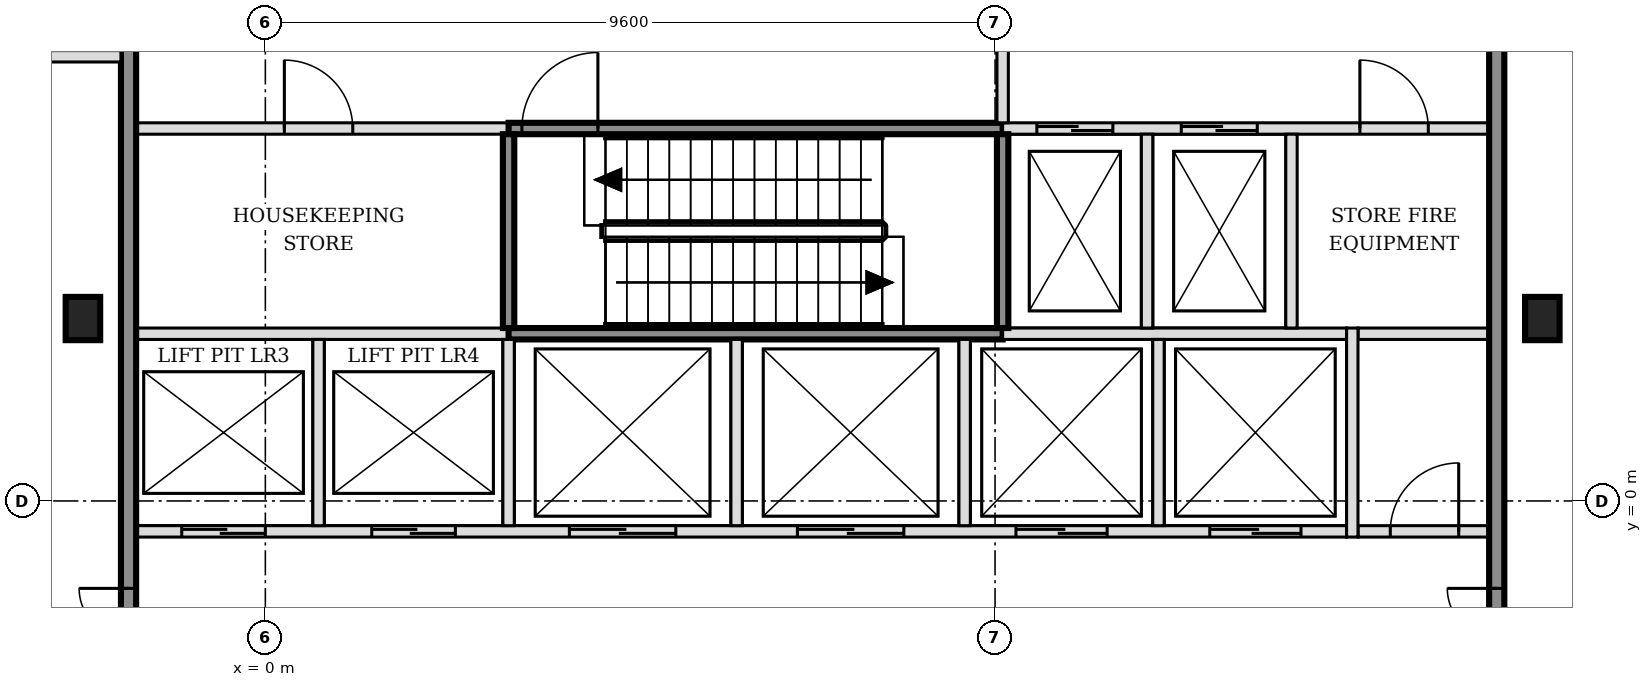
"""IFC4 building model, lengths in metres.
Left out: names, types, materials, properties, quantities, classifications, styles, units other than length and angle.
Written with IfcOpenShell. Run it as: python <this file> out.ifc"""

import sys

from ifc_helpers import new_model, si_unit, direction, frame, frame_2d, origin, origin_2d, place, context, subcontext, project, spatial, rectangle, i_section, extrude, element, fill, save


model = new_model("IFC4")
c1 = context("Model", 3, precision=1e-05, world=origin(), true_north=direction((0.0, 1.0)))
c2 = subcontext(c1, "Body", "Model", "MODEL_VIEW")
j1 = project(units=[si_unit("LENGTHUNIT", "METRE"), si_unit("PLANEANGLEUNIT", "RADIAN")], contexts=[c1])
p1 = place(None, origin())
s1 = spatial("IfcSite", under=j1, at=p1, CompositionType="ELEMENT")
p2 = place(p1, origin())
s2 = spatial("IfcBuilding", under=s1, at=p2, CompositionType="ELEMENT")
p3 = place(p2, origin())
s3 = spatial("IfcBuildingStorey", under=s2, at=p3, CompositionType="ELEMENT", Elevation=0.0)
for number, where, z_axis, x_axis in (
    (1, (-2.4, 2.4, -0.25), (0.0, 0.0, 1.0), (1.0, 0.0, 0.0)),
    (2, (16.8, 2.4, -0.25), (0.0, 0.0, 1.0), (1.0, 0.0, 0.0)),
):
    element("IfcColumn", number, at=place(p3, frame(where, z_axis=z_axis, x_axis=x_axis)), inside=s3, PredefinedType="COLUMN", context=c2, shape_type="SweptSolid", body=[
        extrude(i_section(OverallWidth=0.454, OverallDepth=0.569, WebThickness=0.078, FlangeThickness=0.125, FilletRadius=0.015, at=origin_2d()), origin(), (0.0, 0.0, 1.0), 9.05),
    ])
p4 = place(p3, frame((-1.7, -0.4, 0.0), z_axis=(0.0, 0.0, 1.0), x_axis=(1.0, 0.0, 0.0)))
e3 = element("IfcWall", 3, at=p4, inside=s3, PredefinedType="SOLIDWALL", context=c2, shape_type="SweptSolid", body=[
    extrude(rectangle(XDim=15.925, YDim=0.15, at=frame_2d((7.962, 0.0))), origin(), (0.0, 0.0, 1.0), 8.8),
])
p5 = place(p4, frame((0.6, 0.0, 0.0)))
e4 = element("IfcOpeningElement", 4, at=p5, cuts=e3, PredefinedType="OPENING", context=c2, shape_type="SweptSolid", body=[
    extrude(rectangle(XDim=1.1, YDim=2.1, at=frame_2d((0.55, 1.05))), frame((0.0, 0.085, 0.0), z_axis=(0.0, -1.0, 0.0), x_axis=(1.0, 0.0, 0.0)), (0.0, 0.0, 1.0), 0.17),
])
p6 = place(p4, frame((3.1, 0.0, 0.0)))
e5 = element("IfcOpeningElement", 5, at=p6, cuts=e3, PredefinedType="OPENING", context=c2, shape_type="SweptSolid", body=[
    extrude(rectangle(XDim=1.1, YDim=2.1, at=frame_2d((0.55, 1.05))), frame((0.0, 0.085, 0.0), z_axis=(0.0, -1.0, 0.0), x_axis=(1.0, 0.0, 0.0)), (0.0, 0.0, 1.0), 0.17),
])
p7 = place(p4, frame((5.7, 0.0, 0.0)))
e6 = element("IfcOpeningElement", 6, at=p7, cuts=e3, PredefinedType="OPENING", context=c2, shape_type="SweptSolid", body=[
    extrude(rectangle(XDim=1.4, YDim=2.1, at=frame_2d((0.7, 1.05))), frame((0.0, 0.085, 0.0), z_axis=(0.0, -1.0, 0.0), x_axis=(1.0, 0.0, 0.0)), (0.0, 0.0, 1.0), 0.17),
])
p8 = place(p4, frame((8.7, 0.0, 0.0)))
e7 = element("IfcOpeningElement", 7, at=p8, cuts=e3, PredefinedType="OPENING", context=c2, shape_type="SweptSolid", body=[
    extrude(rectangle(XDim=1.4, YDim=2.1, at=frame_2d((0.7, 1.05))), frame((0.0, 0.085, 0.0), z_axis=(0.0, -1.0, 0.0), x_axis=(1.0, 0.0, 0.0)), (0.0, 0.0, 1.0), 0.17),
])
p9 = place(p4, frame((11.575, 0.0, 0.0)))
e8 = element("IfcOpeningElement", 8, at=p9, cuts=e3, PredefinedType="OPENING", context=c2, shape_type="SweptSolid", body=[
    extrude(rectangle(XDim=1.2, YDim=2.1, at=frame_2d((0.6, 1.05))), frame((0.0, 0.085, 0.0), z_axis=(0.0, -1.0, 0.0), x_axis=(1.0, 0.0, 0.0)), (0.0, 0.0, 1.0), 0.17),
])
p10 = place(p4, frame((14.125, 0.0, 0.0)))
e9 = element("IfcOpeningElement", 9, at=p10, cuts=e3, PredefinedType="OPENING", context=c2, shape_type="SweptSolid", body=[
    extrude(rectangle(XDim=1.2, YDim=2.1, at=frame_2d((0.6, 1.05))), frame((0.0, 0.085, 0.0), z_axis=(0.0, -1.0, 0.0), x_axis=(1.0, 0.0, 0.0)), (0.0, 0.0, 1.0), 0.17),
])
p11 = place(p3, frame((14.375, -0.4, 0.0), z_axis=(0.0, 0.0, 1.0), x_axis=(1.0, 0.0, 0.0)))
e10 = element("IfcWall", 10, at=p11, inside=s3, PredefinedType="PARTITIONING", context=c2, shape_type="SweptSolid", body=[
    extrude(rectangle(XDim=1.725, YDim=0.15, at=frame_2d((0.863, 0.0))), origin(), (0.0, 0.0, 1.0), 8.8),
])
p12 = place(p11, frame((0.425, 0.0, 0.0)))
e11 = element("IfcOpeningElement", 11, at=p12, cuts=e10, PredefinedType="OPENING", context=c2, shape_type="SweptSolid", body=[
    extrude(rectangle(XDim=0.9, YDim=2.1, at=frame_2d((0.45, 1.05))), frame((0.0, 0.085, 0.0), z_axis=(0.0, -1.0, 0.0), x_axis=(1.0, 0.0, 0.0)), (0.0, 0.0, 1.0), 0.17),
])
p13 = place(p3, frame((-1.7, 2.2, 0.0), z_axis=(0.0, 0.0, 1.0), x_axis=(1.0, 0.0, 0.0)))
e12 = element("IfcWall", 12, at=p13, inside=s3, PredefinedType="SOLIDWALL", context=c2, shape_type="SweptSolid", body=[
    extrude(rectangle(XDim=4.9, YDim=0.15, at=frame_2d((2.45, 0.0))), origin(), (0.0, 0.0, 1.0), 8.8),
])
p14 = place(p3, frame((3.2, 2.2, 0.0), z_axis=(0.0, 0.0, 1.0), x_axis=(1.0, 0.0, 0.0)))
e13 = element("IfcWall", 13, at=p14, inside=s3, PredefinedType="SOLIDWALL", context=c2, shape_type="SweptSolid", body=[
    extrude(rectangle(XDim=6.5, YDim=0.15, at=frame_2d((3.25, 0.0))), origin(), (0.0, 0.0, 1.0), 8.8),
])
p15 = place(p3, frame((9.7, 2.2, 0.0), z_axis=(0.0, 0.0, 1.0), x_axis=(1.0, 0.0, 0.0)))
e14 = element("IfcWall", 14, at=p15, inside=s3, PredefinedType="SOLIDWALL", context=c2, shape_type="SweptSolid", body=[
    extrude(rectangle(XDim=4.525, YDim=0.15, at=frame_2d((2.263, 0.0))), origin(), (0.0, 0.0, 1.0), 8.8),
])
p16 = place(p3, frame((14.375, 2.2, 0.0), z_axis=(0.0, 0.0, 1.0), x_axis=(1.0, 0.0, 0.0)))
e15 = element("IfcWall", 15, at=p16, inside=s3, PredefinedType="PARTITIONING", context=c2, shape_type="SweptSolid", body=[
    extrude(rectangle(XDim=1.725, YDim=0.15, at=frame_2d((0.863, 0.0))), origin(), (0.0, 0.0, 1.0), 8.8),
])
p17 = place(p3, frame((-1.7, 4.9, 0.0), z_axis=(0.0, 0.0, 1.0), x_axis=(1.0, 0.0, 0.0)))
e16 = element("IfcWall", 16, at=p17, inside=s3, PredefinedType="SOLIDWALL", context=c2, shape_type="SweptSolid", body=[
    extrude(rectangle(XDim=4.9, YDim=0.15, at=frame_2d((2.45, 0.0))), origin(), (0.0, 0.0, 1.0), 8.8),
])
p18 = place(p17, frame((1.95, 0.0, 0.0)))
e17 = element("IfcOpeningElement", 17, at=p18, cuts=e16, PredefinedType="OPENING", context=c2, shape_type="SweptSolid", body=[
    extrude(rectangle(XDim=0.9, YDim=2.1, at=frame_2d((0.45, 1.05))), frame((0.0, 0.085, 0.0), z_axis=(0.0, -1.0, 0.0), x_axis=(1.0, 0.0, 0.0)), (0.0, 0.0, 1.0), 0.17),
])
p19 = place(p3, frame((3.2, 4.9, 0.0), z_axis=(0.0, 0.0, 1.0), x_axis=(1.0, 0.0, 0.0)))
e18 = element("IfcWall", 18, at=p19, inside=s3, PredefinedType="SOLIDWALL", context=c2, shape_type="SweptSolid", body=[
    extrude(rectangle(XDim=6.5, YDim=0.15, at=frame_2d((3.25, 0.0))), origin(), (0.0, 0.0, 1.0), 8.8),
])
p20 = place(p19, frame((0.175, 0.0, 0.0)))
e19 = element("IfcOpeningElement", 19, at=p20, cuts=e18, PredefinedType="OPENING", context=c2, shape_type="SweptSolid", body=[
    extrude(rectangle(XDim=1.0, YDim=2.1, at=frame_2d((0.5, 1.05))), frame((0.0, 0.085, 0.0), z_axis=(0.0, -1.0, 0.0), x_axis=(1.0, 0.0, 0.0)), (0.0, 0.0, 1.0), 0.17),
])
p21 = place(p3, frame((9.7, 4.9, 0.0), z_axis=(0.0, 0.0, 1.0), x_axis=(1.0, 0.0, 0.0)))
e20 = element("IfcWall", 20, at=p21, inside=s3, PredefinedType="SOLIDWALL", context=c2, shape_type="SweptSolid", body=[
    extrude(rectangle(XDim=6.4, YDim=0.15, at=frame_2d((3.2, 0.0))), origin(), (0.0, 0.0, 1.0), 8.8),
])
p22 = place(p21, frame((0.45, 0.0, 0.0)))
e21 = element("IfcOpeningElement", 21, at=p22, cuts=e20, PredefinedType="OPENING", context=c2, shape_type="SweptSolid", body=[
    extrude(rectangle(XDim=1.0, YDim=2.1, at=frame_2d((0.5, 1.05))), frame((0.0, 0.085, 0.0), z_axis=(0.0, -1.0, 0.0), x_axis=(1.0, 0.0, 0.0)), (0.0, 0.0, 1.0), 0.17),
])
p23 = place(p21, frame((2.35, 0.0, 0.0)))
e22 = element("IfcOpeningElement", 22, at=p23, cuts=e20, PredefinedType="OPENING", context=c2, shape_type="SweptSolid", body=[
    extrude(rectangle(XDim=1.0, YDim=2.1, at=frame_2d((0.5, 1.05))), frame((0.0, 0.085, 0.0), z_axis=(0.0, -1.0, 0.0), x_axis=(1.0, 0.0, 0.0)), (0.0, 0.0, 1.0), 0.17),
])
p24 = place(p21, frame((4.7, 0.0, 0.0)))
e23 = element("IfcOpeningElement", 23, at=p24, cuts=e20, PredefinedType="OPENING", context=c2, shape_type="SweptSolid", body=[
    extrude(rectangle(XDim=0.9, YDim=2.1, at=frame_2d((0.45, 1.05))), frame((0.0, 0.085, 0.0), z_axis=(0.0, -1.0, 0.0), x_axis=(1.0, 0.0, 0.0)), (0.0, 0.0, 1.0), 0.17),
])
p25 = place(p3, frame((-1.8, -5.5, 0.0), z_axis=(0.0, 0.0, 1.0), x_axis=(0.0, 1.0, 0.0)))
e24 = element("IfcWall", 24, at=p25, inside=s3, PredefinedType="SOLIDWALL", context=c2, shape_type="SweptSolid", body=[
    extrude(rectangle(XDim=15.8, YDim=0.2, at=frame_2d((7.9, 0.0))), origin(), (0.0, 0.0, 1.0), 8.8),
])
p26 = place(p25, frame((3.05, 0.0, 0.0)))
e25 = element("IfcOpeningElement", 25, at=p26, cuts=e24, PredefinedType="OPENING", context=c2, shape_type="SweptSolid", body=[
    extrude(rectangle(XDim=1.3, YDim=2.1, at=frame_2d((0.65, 1.05))), frame((0.0, 0.11, 0.0), z_axis=(0.0, -1.0, 0.0), x_axis=(1.0, 0.0, 0.0)), (0.0, 0.0, 1.0), 0.22),
])
p27 = place(p25, frame((11.45, 0.0, 0.0)))
e26 = element("IfcOpeningElement", 26, at=p27, cuts=e24, PredefinedType="OPENING", context=c2, shape_type="SweptSolid", body=[
    extrude(rectangle(XDim=1.3, YDim=2.1, at=frame_2d((0.65, 1.05))), frame((0.0, 0.11, 0.0), z_axis=(0.0, -1.0, 0.0), x_axis=(1.0, 0.0, 0.0)), (0.0, 0.0, 1.0), 0.22),
])
for number, where, z_axis, x_axis in (
    (27, (0.7, -0.325, 0.0), (0.0, 0.0, 1.0), (0.0, 1.0, 0.0)),
    (28, (3.2, -0.325, 0.0), (0.0, 0.0, 1.0), (0.0, 1.0, 0.0)),
):
    element("IfcWall", number, at=place(p3, frame(where, z_axis=z_axis, x_axis=x_axis)), inside=s3, PredefinedType="SOLIDWALL", context=c2, shape_type="SweptSolid", body=[
        extrude(rectangle(XDim=2.45, YDim=0.15, at=frame_2d((1.225, 0.0))), origin(), (0.0, 0.0, 1.0), 8.8),
    ])
p28 = place(p3, frame((3.2, 2.275, 0.0), z_axis=(0.0, 0.0, 1.0), x_axis=(0.0, 1.0, 0.0)))
e29 = element("IfcWall", 29, at=p28, inside=s3, PredefinedType="SOLIDWALL", context=c2, shape_type="SweptSolid", body=[
    extrude(rectangle(XDim=2.55, YDim=0.15, at=frame_2d((1.275, 0.0))), origin(), (0.0, 0.0, 1.0), 8.8),
])
for number, where, z_axis, x_axis in (
    (30, (6.2, -0.325, 0.0), (0.0, 0.0, 1.0), (0.0, 1.0, 0.0)),
    (31, (9.2, -0.325, 0.0), (0.0, 0.0, 1.0), (0.0, 1.0, 0.0)),
):
    element("IfcWall", number, at=place(p3, frame(where, z_axis=z_axis, x_axis=x_axis)), inside=s3, PredefinedType="SOLIDWALL", context=c2, shape_type="SweptSolid", body=[
        extrude(rectangle(XDim=2.45, YDim=0.15, at=frame_2d((1.225, 0.0))), origin(), (0.0, 0.0, 1.0), 8.8),
    ])
p29 = place(p3, frame((9.7, 2.275, 0.0), z_axis=(0.0, 0.0, 1.0), x_axis=(0.0, 1.0, 0.0)))
e32 = element("IfcWall", 32, at=p29, inside=s3, PredefinedType="SOLIDWALL", context=c2, shape_type="SweptSolid", body=[
    extrude(rectangle(XDim=2.55, YDim=0.15, at=frame_2d((1.275, 0.0))), origin(), (0.0, 0.0, 1.0), 8.8),
])
p30 = place(p3, frame((9.7, 4.975, 0.0), z_axis=(0.0, 0.0, 1.0), x_axis=(0.0, 1.0, 0.0)))
e33 = element("IfcWall", 33, at=p30, inside=s3, PredefinedType="SOLIDWALL", context=c2, shape_type="SweptSolid", body=[
    extrude(rectangle(XDim=2.45, YDim=0.15, at=frame_2d((1.225, 0.0))), origin(), (0.0, 0.0, 1.0), 8.8),
])
p31 = place(p3, frame((11.6, 2.275, 0.0), z_axis=(0.0, 0.0, 1.0), x_axis=(0.0, 1.0, 0.0)))
e34 = element("IfcWall", 34, at=p31, inside=s3, PredefinedType="SOLIDWALL", context=c2, shape_type="SweptSolid", body=[
    extrude(rectangle(XDim=2.55, YDim=0.15, at=frame_2d((1.275, 0.0))), origin(), (0.0, 0.0, 1.0), 8.8),
])
p32 = place(p3, frame((11.75, -0.325, 0.0), z_axis=(0.0, 0.0, 1.0), x_axis=(0.0, 1.0, 0.0)))
e35 = element("IfcWall", 35, at=p32, inside=s3, PredefinedType="SOLIDWALL", context=c2, shape_type="SweptSolid", body=[
    extrude(rectangle(XDim=2.45, YDim=0.15, at=frame_2d((1.225, 0.0))), origin(), (0.0, 0.0, 1.0), 8.8),
])
p33 = place(p3, frame((13.5, 2.275, 0.0), z_axis=(0.0, 0.0, 1.0), x_axis=(0.0, 1.0, 0.0)))
e36 = element("IfcWall", 36, at=p33, inside=s3, PredefinedType="SOLIDWALL", context=c2, shape_type="SweptSolid", body=[
    extrude(rectangle(XDim=2.55, YDim=0.15, at=frame_2d((1.275, 0.0))), origin(), (0.0, 0.0, 1.0), 8.8),
])
p34 = place(p3, frame((14.3, -0.475, 0.0), z_axis=(0.0, 0.0, 1.0), x_axis=(0.0, 1.0, 0.0)))
e37 = element("IfcWall", 37, at=p34, inside=s3, PredefinedType="SOLIDWALL", context=c2, shape_type="SweptSolid", body=[
    extrude(rectangle(XDim=2.75, YDim=0.15, at=frame_2d((1.375, 0.0))), origin(), (0.0, 0.0, 1.0), 8.8),
])
p35 = place(p3, frame((16.2, -5.5, 0.0), z_axis=(0.0, 0.0, 1.0), x_axis=(0.0, 1.0, 0.0)))
e38 = element("IfcWall", 38, at=p35, inside=s3, PredefinedType="SOLIDWALL", context=c2, shape_type="SweptSolid", body=[
    extrude(rectangle(XDim=15.8, YDim=0.2, at=frame_2d((7.9, 0.0))), origin(), (0.0, 0.0, 1.0), 8.8),
])
p36 = place(p35, frame((3.05, 0.0, 0.0)))
e39 = element("IfcOpeningElement", 39, at=p36, cuts=e38, PredefinedType="OPENING", context=c2, shape_type="SweptSolid", body=[
    extrude(rectangle(XDim=1.3, YDim=2.1, at=frame_2d((0.65, 1.05))), frame((0.0, 0.11, 0.0), z_axis=(0.0, -1.0, 0.0), x_axis=(1.0, 0.0, 0.0)), (0.0, 0.0, 1.0), 0.22),
])
p37 = place(p35, frame((11.45, 0.0, 0.0)))
e40 = element("IfcOpeningElement", 40, at=p37, cuts=e38, PredefinedType="OPENING", context=c2, shape_type="SweptSolid", body=[
    extrude(rectangle(XDim=1.3, YDim=2.1, at=frame_2d((0.65, 1.05))), frame((0.0, 0.11, 0.0), z_axis=(0.0, -1.0, 0.0), x_axis=(1.0, 0.0, 0.0)), (0.0, 0.0, 1.0), 0.22),
])
p38 = place(p3, frame((-33.5, 5.85, 0.0), z_axis=(0.0, 0.0, 1.0), x_axis=(1.0, 0.0, 0.0)))
e41 = element("IfcWall", 41, at=p38, inside=s3, PredefinedType="SOLIDWALL", context=c2, shape_type="SweptSolid", body=[
    extrude(rectangle(XDim=31.6, YDim=0.15, at=frame_2d((15.8, 0.0))), origin(), (0.0, 0.0, 1.0), 8.8),
])
p39 = place(p5, origin())
e42 = element("IfcDoor", 42, at=p39, inside=s3, OperationType="DOUBLE_DOOR_SLIDING", PredefinedType="DOOR", context=c2, shape_type="SweptSolid", body=[
    extrude(rectangle(XDim=1.1, YDim=2.1, at=frame_2d((0.55, 1.05))), frame((0.0, 0.025, 0.0), z_axis=(0.0, -1.0, 0.0), x_axis=(1.0, 0.0, 0.0)), (0.0, 0.0, 1.0), 0.05),
])
fill(e4, e42)
p40 = place(p6, origin())
e43 = element("IfcDoor", 43, at=p40, inside=s3, OperationType="DOUBLE_DOOR_SLIDING", PredefinedType="DOOR", context=c2, shape_type="SweptSolid", body=[
    extrude(rectangle(XDim=1.1, YDim=2.1, at=frame_2d((0.55, 1.05))), frame((0.0, 0.025, 0.0), z_axis=(0.0, -1.0, 0.0), x_axis=(1.0, 0.0, 0.0)), (0.0, 0.0, 1.0), 0.05),
])
fill(e5, e43)
p41 = place(p7, origin())
e44 = element("IfcDoor", 44, at=p41, inside=s3, OperationType="DOUBLE_DOOR_SLIDING", PredefinedType="DOOR", context=c2, shape_type="SweptSolid", body=[
    extrude(rectangle(XDim=1.4, YDim=2.1, at=frame_2d((0.7, 1.05))), frame((0.0, 0.025, 0.0), z_axis=(0.0, -1.0, 0.0), x_axis=(1.0, 0.0, 0.0)), (0.0, 0.0, 1.0), 0.05),
])
fill(e6, e44)
p42 = place(p8, origin())
e45 = element("IfcDoor", 45, at=p42, inside=s3, OperationType="DOUBLE_DOOR_SLIDING", PredefinedType="DOOR", context=c2, shape_type="SweptSolid", body=[
    extrude(rectangle(XDim=1.4, YDim=2.1, at=frame_2d((0.7, 1.05))), frame((0.0, 0.025, 0.0), z_axis=(0.0, -1.0, 0.0), x_axis=(1.0, 0.0, 0.0)), (0.0, 0.0, 1.0), 0.05),
])
fill(e7, e45)
p43 = place(p9, origin())
e46 = element("IfcDoor", 46, at=p43, inside=s3, OperationType="DOUBLE_DOOR_SLIDING", PredefinedType="DOOR", context=c2, shape_type="SweptSolid", body=[
    extrude(rectangle(XDim=1.2, YDim=2.1, at=frame_2d((0.6, 1.05))), frame((0.0, 0.025, 0.0), z_axis=(0.0, -1.0, 0.0), x_axis=(1.0, 0.0, 0.0)), (0.0, 0.0, 1.0), 0.05),
])
fill(e8, e46)
p44 = place(p10, origin())
e47 = element("IfcDoor", 47, at=p44, inside=s3, OperationType="DOUBLE_DOOR_SLIDING", PredefinedType="DOOR", context=c2, shape_type="SweptSolid", body=[
    extrude(rectangle(XDim=1.2, YDim=2.1, at=frame_2d((0.6, 1.05))), frame((0.0, 0.025, 0.0), z_axis=(0.0, -1.0, 0.0), x_axis=(1.0, 0.0, 0.0)), (0.0, 0.0, 1.0), 0.05),
])
fill(e9, e47)
p45 = place(p22, origin())
e48 = element("IfcDoor", 48, at=p45, inside=s3, OperationType="DOUBLE_DOOR_SLIDING", PredefinedType="DOOR", context=c2, shape_type="SweptSolid", body=[
    extrude(rectangle(XDim=1.0, YDim=2.1, at=frame_2d((0.5, 1.05))), frame((0.0, 0.025, 0.0), z_axis=(0.0, -1.0, 0.0), x_axis=(1.0, 0.0, 0.0)), (0.0, 0.0, 1.0), 0.05),
])
fill(e21, e48)
p46 = place(p23, origin())
e49 = element("IfcDoor", 49, at=p46, inside=s3, OperationType="DOUBLE_DOOR_SLIDING", PredefinedType="DOOR", context=c2, shape_type="SweptSolid", body=[
    extrude(rectangle(XDim=1.0, YDim=2.1, at=frame_2d((0.5, 1.05))), frame((0.0, 0.025, 0.0), z_axis=(0.0, -1.0, 0.0), x_axis=(1.0, 0.0, 0.0)), (0.0, 0.0, 1.0), 0.05),
])
fill(e22, e49)
p47 = place(p20, origin())
e50 = element("IfcDoor", 50, at=p47, inside=s3, OperationType="SINGLE_SWING_RIGHT", PredefinedType="DOOR", context=c2, shape_type="SweptSolid", body=[
    extrude(rectangle(XDim=1.0, YDim=2.1, at=frame_2d((0.5, 1.05))), frame((0.0, 0.025, 0.0), z_axis=(0.0, -1.0, 0.0), x_axis=(1.0, 0.0, 0.0)), (0.0, 0.0, 1.0), 0.05),
])
fill(e19, e50)
p48 = place(p26, origin())
e51 = element("IfcDoor", 51, at=p48, inside=s3, OperationType="DOUBLE_DOOR_SINGLE_SWING", PredefinedType="DOOR", context=c2, shape_type="SweptSolid", body=[
    extrude(rectangle(XDim=1.3, YDim=2.1, at=frame_2d((0.65, 1.05))), frame((0.0, 0.025, 0.0), z_axis=(0.0, -1.0, 0.0), x_axis=(1.0, 0.0, 0.0)), (0.0, 0.0, 1.0), 0.05),
])
fill(e25, e51)
p49 = place(p36, origin())
e52 = element("IfcDoor", 52, at=p49, inside=s3, OperationType="DOUBLE_DOOR_SINGLE_SWING", PredefinedType="DOOR", context=c2, shape_type="SweptSolid", body=[
    extrude(rectangle(XDim=1.3, YDim=2.1, at=frame_2d((0.65, 1.05))), frame((0.0, 0.025, 0.0), z_axis=(0.0, -1.0, 0.0), x_axis=(1.0, 0.0, 0.0)), (0.0, 0.0, 1.0), 0.05),
])
fill(e39, e52)
p50 = place(p12, origin())
e53 = element("IfcDoor", 53, at=p50, inside=s3, OperationType="SINGLE_SWING_RIGHT", PredefinedType="DOOR", context=c2, shape_type="SweptSolid", body=[
    extrude(rectangle(XDim=0.9, YDim=2.1, at=frame_2d((0.45, 1.05))), frame((0.0, 0.025, 0.0), z_axis=(0.0, -1.0, 0.0), x_axis=(1.0, 0.0, 0.0)), (0.0, 0.0, 1.0), 0.05),
])
fill(e11, e53)
p51 = place(p24, origin())
e54 = element("IfcDoor", 54, at=p51, inside=s3, OperationType="SINGLE_SWING_LEFT", PredefinedType="DOOR", context=c2, shape_type="SweptSolid", body=[
    extrude(rectangle(XDim=0.9, YDim=2.1, at=frame_2d((0.45, 1.05))), frame((0.0, 0.025, 0.0), z_axis=(0.0, -1.0, 0.0), x_axis=(1.0, 0.0, 0.0)), (0.0, 0.0, 1.0), 0.05),
])
fill(e23, e54)
p52 = place(p18, origin())
e55 = element("IfcDoor", 55, at=p52, inside=s3, OperationType="SINGLE_SWING_LEFT", PredefinedType="DOOR", context=c2, shape_type="SweptSolid", body=[
    extrude(rectangle(XDim=0.9, YDim=2.1, at=frame_2d((0.45, 1.05))), frame((0.0, 0.025, 0.0), z_axis=(0.0, -1.0, 0.0), x_axis=(1.0, 0.0, 0.0)), (0.0, 0.0, 1.0), 0.05),
])
fill(e17, e55)
save(model, sys.argv[1])
